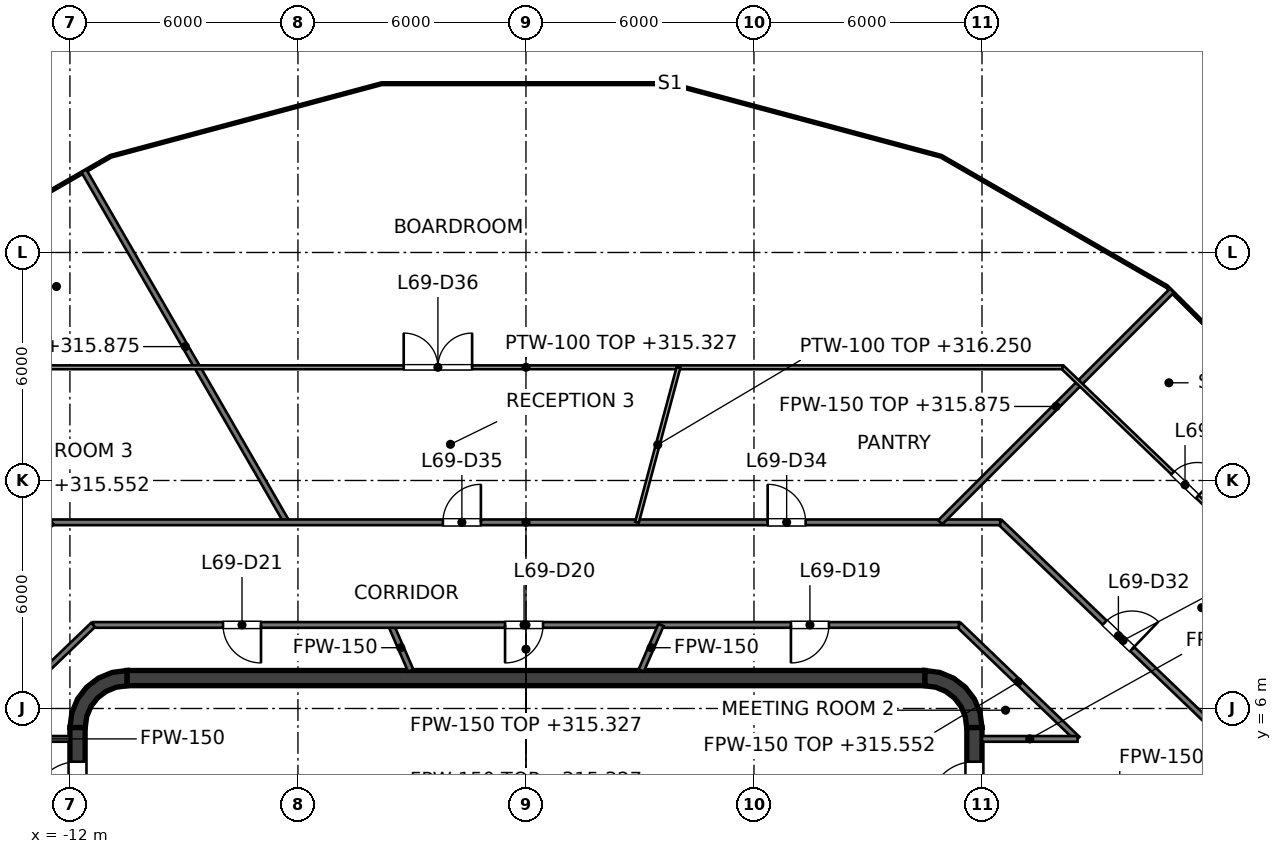
"""IFC4 building model, lengths in metres.
Left out: names, types, materials, properties, quantities, classifications, styles, units other than length and angle.
Written with IfcOpenShell. Run it as: python <this file> out.ifc"""

import sys

from ifc_helpers import new_model, si_unit, direction, frame, frame_2d, origin, place, context, subcontext, project, spatial, polyline, rectangle, outline, extrude, element, fill, save


model = new_model("IFC4")
c1 = context("Model", 3, precision=1e-05, world=origin(), true_north=direction((0.0, 1.0)))
c2 = subcontext(c1, "Body", "Model", "MODEL_VIEW")
j1 = project(units=[si_unit("LENGTHUNIT", "METRE"), si_unit("PLANEANGLEUNIT", "RADIAN")], contexts=[c1])
p1 = place(None, origin())
s1 = spatial("IfcSite", under=j1, at=p1, CompositionType="ELEMENT")
p2 = place(p1, origin())
s2 = spatial("IfcBuilding", under=s1, at=p2, CompositionType="ELEMENT")
p3 = place(p2, frame((0.0, 0.0, 312.4)))
s3 = spatial("IfcBuildingStorey", under=s2, at=p3, CompositionType="ELEMENT", Elevation=312.4)
p4 = place(p3, frame((-10.5, 6.8, 0.0), z_axis=(0.0, 0.0, 1.0), x_axis=(1.0, 0.0, 0.0)))
e1 = element("IfcWall", 1, at=p4, inside=s3, PredefinedType="SHEAR", context=c2, shape_type="SweptSolid", body=[
    extrude(rectangle(XDim=21.0, YDim=0.4, at=frame_2d((10.5, 0.0))), origin(), (0.0, 0.0, 1.0), 4.0),
])
p5 = place(p3, frame((11.8, -5.5, 0.0), z_axis=(0.0, 0.0, 1.0), x_axis=(0.0, 1.0, 0.0)))
e2 = element("IfcWall", 2, at=p5, inside=s3, PredefinedType="SHEAR", context=c2, shape_type="SweptSolid", body=[
    extrude(rectangle(XDim=11.0, YDim=0.4, at=frame_2d((5.5, 0.0))), origin(), (0.0, 0.0, 1.0), 4.0),
])
p6 = place(p5, frame((5.0, 0.0, 0.0)))
e3 = element("IfcOpeningElement", 3, at=p6, cuts=e2, PredefinedType="OPENING", context=c2, shape_type="SweptSolid", body=[
    extrude(rectangle(XDim=1.0, YDim=2.1, at=frame_2d((0.5, 1.05))), frame((0.0, 0.2, 0.0), z_axis=(0.0, -1.0, 0.0), x_axis=(1.0, 0.0, 0.0)), (0.0, 0.0, 1.0), 0.4),
])
p7 = place(p5, frame((0.9, 0.0, 0.0)))
e4 = element("IfcOpeningElement", 4, at=p7, cuts=e2, PredefinedType="OPENING", context=c2, shape_type="SweptSolid", body=[
    extrude(rectangle(XDim=1.2, YDim=2.1, at=frame_2d((0.6, 1.05))), frame((0.0, 0.2, 0.0), z_axis=(0.0, -1.0, 0.0), x_axis=(1.0, 0.0, 0.0)), (0.0, 0.0, 1.0), 0.4),
])
p8 = place(p5, frame((8.9, 0.0, 0.0)))
e5 = element("IfcOpeningElement", 5, at=p8, cuts=e2, PredefinedType="OPENING", context=c2, shape_type="SweptSolid", body=[
    extrude(rectangle(XDim=1.2, YDim=2.1, at=frame_2d((0.6, 1.05))), frame((0.0, 0.2, 0.0), z_axis=(0.0, -1.0, 0.0), x_axis=(1.0, 0.0, 0.0)), (0.0, 0.0, 1.0), 0.4),
])
p9 = place(p3, frame((-11.8, -5.5, 0.0), z_axis=(0.0, 0.0, 1.0), x_axis=(0.0, 1.0, 0.0)))
e6 = element("IfcWall", 6, at=p9, inside=s3, PredefinedType="SHEAR", context=c2, shape_type="SweptSolid", body=[
    extrude(rectangle(XDim=11.0, YDim=0.4, at=frame_2d((5.5, 0.0))), origin(), (0.0, 0.0, 1.0), 4.0),
])
p10 = place(p9, frame((5.0, 0.0, 0.0)))
e7 = element("IfcOpeningElement", 7, at=p10, cuts=e6, PredefinedType="OPENING", context=c2, shape_type="SweptSolid", body=[
    extrude(rectangle(XDim=1.0, YDim=2.1, at=frame_2d((0.5, 1.05))), frame((0.0, 0.2, 0.0), z_axis=(0.0, -1.0, 0.0), x_axis=(1.0, 0.0, 0.0)), (0.0, 0.0, 1.0), 0.4),
])
p11 = place(p9, frame((0.9, 0.0, 0.0)))
e8 = element("IfcOpeningElement", 8, at=p11, cuts=e6, PredefinedType="OPENING", context=c2, shape_type="SweptSolid", body=[
    extrude(rectangle(XDim=1.2, YDim=2.1, at=frame_2d((0.6, 1.05))), frame((0.0, 0.2, 0.0), z_axis=(0.0, -1.0, 0.0), x_axis=(1.0, 0.0, 0.0)), (0.0, 0.0, 1.0), 0.4),
])
p12 = place(p9, frame((8.9, 0.0, 0.0)))
e9 = element("IfcOpeningElement", 9, at=p12, cuts=e6, PredefinedType="OPENING", context=c2, shape_type="SweptSolid", body=[
    extrude(rectangle(XDim=1.2, YDim=2.1, at=frame_2d((0.6, 1.05))), frame((0.0, 0.2, 0.0), z_axis=(0.0, -1.0, 0.0), x_axis=(1.0, 0.0, 0.0)), (0.0, 0.0, 1.0), 0.4),
])
p13 = place(p3, origin())
e10 = element("IfcWall", 10, at=p13, inside=s3, PredefinedType="SHEAR", context=c2, shape_type="SweptSolid", body=[
    extrude(outline(polyline([(10.5, 7.0), (10.5, 6.596), (10.784, 6.559), (11.048, 6.45), (11.275, 6.275), (11.45, 6.048), (11.559, 5.784), (11.596, 5.5), (12.0, 5.5), (11.949, 5.888), (11.799, 6.25), (11.561, 6.561), (11.25, 6.799), (10.888, 6.949), (10.5, 7.0)])), origin(), (0.0, 0.0, 1.0), 4.0),
])
e11 = element("IfcWall", 11, at=p13, inside=s3, PredefinedType="SHEAR", context=c2, shape_type="SweptSolid", body=[
    extrude(outline(polyline([(-12.0, 5.5), (-11.596, 5.5), (-11.559, 5.784), (-11.45, 6.048), (-11.275, 6.275), (-11.048, 6.45), (-10.784, 6.559), (-10.5, 6.596), (-10.5, 7.0), (-10.888, 6.949), (-11.25, 6.799), (-11.561, 6.561), (-11.799, 6.25), (-11.949, 5.888), (-12.0, 5.5)])), origin(), (0.0, 0.0, 1.0), 4.0),
])
p14 = place(p3, frame((-9.0, 4.1, 0.0), z_axis=(0.0, 0.0, 1.0), x_axis=(0.0, 1.0, 0.0)))
e12 = element("IfcWall", 12, at=p14, inside=s3, PredefinedType="SOLIDWALL", context=c2, shape_type="SweptSolid", body=[
    extrude(rectangle(XDim=2.5, YDim=0.25, at=frame_2d((1.25, 0.0))), origin(), (0.0, 0.0, 1.0), 3.85),
])
p15 = place(p14, frame((0.65, 0.0, 0.0)))
e13 = element("IfcOpeningElement", 13, at=p15, cuts=e12, PredefinedType="OPENING", context=c2, shape_type="SweptSolid", body=[
    extrude(rectangle(XDim=1.2, YDim=2.1, at=frame_2d((0.6, 1.05))), frame((0.0, 0.125, 0.0), z_axis=(0.0, -1.0, 0.0), x_axis=(1.0, 0.0, 0.0)), (0.0, 0.0, 1.0), 0.25),
])
p16 = place(p3, frame((9.0, 4.1, 0.0), z_axis=(0.0, 0.0, 1.0), x_axis=(0.0, 1.0, 0.0)))
e14 = element("IfcWall", 14, at=p16, inside=s3, PredefinedType="SOLIDWALL", context=c2, shape_type="SweptSolid", body=[
    extrude(rectangle(XDim=2.5, YDim=0.25, at=frame_2d((1.25, 0.0))), origin(), (0.0, 0.0, 1.0), 3.85),
])
p17 = place(p16, frame((0.65, 0.0, 0.0)))
e15 = element("IfcOpeningElement", 15, at=p17, cuts=e14, PredefinedType="OPENING", context=c2, shape_type="SweptSolid", body=[
    extrude(rectangle(XDim=1.2, YDim=2.1, at=frame_2d((0.6, 1.05))), frame((0.0, 0.125, 0.0), z_axis=(0.0, -1.0, 0.0), x_axis=(1.0, 0.0, 0.0)), (0.0, 0.0, 1.0), 0.25),
])
for number, where, z_axis, x_axis in (
    (16, (-3.15, 4.1, 0.0), (0.0, 0.0, 1.0), (0.0, 1.0, 0.0)),
    (17, (3.15, 4.1, 0.0), (0.0, 0.0, 1.0), (0.0, 1.0, 0.0)),
):
    element("IfcWall", number, at=place(p3, frame(where, z_axis=z_axis, x_axis=x_axis)), inside=s3, PredefinedType="SOLIDWALL", context=c2, shape_type="SweptSolid", body=[
        extrude(rectangle(XDim=2.5, YDim=0.25, at=frame_2d((1.25, 0.0))), origin(), (0.0, 0.0, 1.0), 3.85),
    ])
p18 = place(p3, frame((-3.553, 8.199, 0.0), z_axis=(0.0, 0.0, 1.0), x_axis=(0.397906243356, -0.917426085033, 0.0)))
e18 = element("IfcWall", 18, at=p18, inside=s3, PredefinedType="PARTITIONING", context=c2, shape_type="SweptSolid", body=[
    extrude(rectangle(XDim=1.307, YDim=0.15, at=frame_2d((0.653, 0.0))), origin(), (0.0, 0.0, 1.0), 3.85),
])
p19 = place(p3, frame((-11.632, 20.147, 0.0), z_axis=(0.0, 0.0, 1.0), x_axis=(0.499965221797, -0.866045482058, 0.0)))
e19 = element("IfcWall", 19, at=p19, inside=s3, PredefinedType="PARTITIONING", context=c2, shape_type="SweptSolid", body=[
    extrude(rectangle(XDim=10.678, YDim=0.15, at=frame_2d((5.339, 0.0))), origin(), (0.0, 0.0, 1.0), 3.475),
])
p20 = place(p3, frame((11.391, 8.199, 0.0), z_axis=(0.0, 0.0, 1.0), x_axis=(0.721311820102, -0.69261046641, 0.0)))
e20 = element("IfcWall", 20, at=p20, inside=s3, PredefinedType="PARTITIONING", context=c2, shape_type="SweptSolid", body=[
    extrude(rectangle(XDim=4.33, YDim=0.15, at=frame_2d((2.165, 0.0))), origin(), (0.0, 0.0, 1.0), 3.152),
])
p21 = place(p3, frame((12.478, 10.899, 0.0), z_axis=(0.0, 0.0, 1.0), x_axis=(0.721299239471, -0.692623568137, 0.0)))
e21 = element("IfcWall", 21, at=p21, inside=s3, PredefinedType="PARTITIONING", context=c2, shape_type="SweptSolid", body=[
    extrude(rectangle(XDim=8.974, YDim=0.15, at=frame_2d((4.487, 0.0))), origin(), (0.0, 0.0, 1.0), 3.076),
])
p22 = place(p21, frame((3.813, 0.0, 0.0)))
e22 = element("IfcOpeningElement", 22, at=p22, cuts=e21, PredefinedType="OPENING", context=c2, shape_type="SweptSolid", body=[
    extrude(rectangle(XDim=1.0, YDim=2.1, at=frame_2d((0.5, 1.05))), frame((0.0, 0.075, 0.0), z_axis=(0.0, -1.0, 0.0), x_axis=(1.0, 0.0, 0.0)), (0.0, 0.0, 1.0), 0.15),
])
for number, where, z_axis, x_axis in (
    (23, (-14.514, 5.2, 0.0), (0.0, 0.0, 1.0), (1.0, 0.0, 0.0)),
    (24, (12.0, 5.2, 0.0), (0.0, 0.0, 1.0), (1.0, 0.0, 0.0)),
):
    element("IfcWall", number, at=place(p3, frame(where, z_axis=z_axis, x_axis=x_axis)), inside=s3, PredefinedType="PARTITIONING", context=c2, shape_type="SweptSolid", body=[
        extrude(rectangle(XDim=2.514, YDim=0.15, at=frame_2d((1.257, 0.0))), origin(), (0.0, 0.0, 1.0), 3.85),
    ])
p23 = place(p3, frame((-11.391, 8.199, 0.0), z_axis=(0.0, 0.0, 1.0), x_axis=(1.0, 0.0, 0.0)))
e25 = element("IfcWall", 25, at=p23, inside=s3, PredefinedType="PARTITIONING", context=c2, shape_type="SweptSolid", body=[
    extrude(rectangle(XDim=22.782, YDim=0.15, at=frame_2d((11.391, 0.0))), origin(), (0.0, 0.0, 1.0), 2.927),
])
p24 = place(p23, frame((18.363, 0.0, 0.0)))
e26 = element("IfcOpeningElement", 26, at=p24, cuts=e25, PredefinedType="OPENING", context=c2, shape_type="SweptSolid", body=[
    extrude(rectangle(XDim=1.0, YDim=2.1, at=frame_2d((0.5, 1.05))), frame((0.0, 0.075, 0.0), z_axis=(0.0, -1.0, 0.0), x_axis=(1.0, 0.0, 0.0)), (0.0, 0.0, 1.0), 0.15),
])
p25 = place(p23, frame((10.841, 0.0, 0.0)))
e27 = element("IfcOpeningElement", 27, at=p25, cuts=e25, PredefinedType="OPENING", context=c2, shape_type="SweptSolid", body=[
    extrude(rectangle(XDim=1.0, YDim=2.1, at=frame_2d((0.5, 1.05))), frame((0.0, 0.075, 0.0), z_axis=(0.0, -1.0, 0.0), x_axis=(1.0, 0.0, 0.0)), (0.0, 0.0, 1.0), 0.15),
])
p26 = place(p23, frame((3.419, 0.0, 0.0)))
e28 = element("IfcOpeningElement", 28, at=p26, cuts=e25, PredefinedType="OPENING", context=c2, shape_type="SweptSolid", body=[
    extrude(rectangle(XDim=1.0, YDim=2.1, at=frame_2d((0.5, 1.05))), frame((0.0, 0.075, 0.0), z_axis=(0.0, -1.0, 0.0), x_axis=(1.0, 0.0, 0.0)), (0.0, 0.0, 1.0), 0.15),
])
p27 = place(p3, frame((-12.478, 10.899, 0.0), z_axis=(0.0, 0.0, 1.0), x_axis=(1.0, 0.0, 0.0)))
e29 = element("IfcWall", 29, at=p27, inside=s3, PredefinedType="PARTITIONING", context=c2, shape_type="SweptSolid", body=[
    extrude(rectangle(XDim=24.956, YDim=0.15, at=frame_2d((12.478, 0.0))), origin(), (0.0, 0.0, 1.0), 2.927),
])
p28 = place(p27, frame((18.838, 0.0, 0.0)))
e30 = element("IfcOpeningElement", 30, at=p28, cuts=e29, PredefinedType="OPENING", context=c2, shape_type="SweptSolid", body=[
    extrude(rectangle(XDim=1.0, YDim=2.1, at=frame_2d((0.5, 1.05))), frame((0.0, 0.075, 0.0), z_axis=(0.0, -1.0, 0.0), x_axis=(1.0, 0.0, 0.0)), (0.0, 0.0, 1.0), 0.15),
])
p29 = place(p27, frame((10.292, 0.0, 0.0)))
e31 = element("IfcOpeningElement", 31, at=p29, cuts=e29, PredefinedType="OPENING", context=c2, shape_type="SweptSolid", body=[
    extrude(rectangle(XDim=1.0, YDim=2.1, at=frame_2d((0.5, 1.05))), frame((0.0, 0.075, 0.0), z_axis=(0.0, -1.0, 0.0), x_axis=(1.0, 0.0, 0.0)), (0.0, 0.0, 1.0), 0.15),
])
p30 = place(p3, frame((-14.514, 5.2, 0.0), z_axis=(0.0, 0.0, 1.0), x_axis=(0.721228427004, 0.692697304803, 0.0)))
e32 = element("IfcWall", 32, at=p30, inside=s3, PredefinedType="PARTITIONING", context=c2, shape_type="SweptSolid", body=[
    extrude(rectangle(XDim=4.33, YDim=0.15, at=frame_2d((2.165, 0.0))), origin(), (0.0, 0.0, 1.0), 3.152),
])
p31 = place(p3, frame((-18.95, 4.683, 0.0), z_axis=(0.0, 0.0, 1.0), x_axis=(0.721259541977, 0.692664906797, 0.0)))
e33 = element("IfcWall", 33, at=p31, inside=s3, PredefinedType="PARTITIONING", context=c2, shape_type="SweptSolid", body=[
    extrude(rectangle(XDim=8.973, YDim=0.15, at=frame_2d((4.487, 0.0))), origin(), (0.0, 0.0, 1.0), 3.076),
])
p32 = place(p3, frame((10.9, 10.899, 0.0), z_axis=(0.0, 0.0, 1.0), x_axis=(0.707106781187, 0.707106781187, 0.0)))
e34 = element("IfcWall", 34, at=p32, inside=s3, PredefinedType="PARTITIONING", context=c2, shape_type="SweptSolid", body=[
    extrude(rectangle(XDim=8.624, YDim=0.15, at=frame_2d((4.312, 0.0))), origin(), (0.0, 0.0, 1.0), 3.475),
])
p33 = place(p3, frame((3.033, 7.0, 0.0), z_axis=(0.0, 0.0, 1.0), x_axis=(0.397906243356, 0.917426085033, 0.0)))
e35 = element("IfcWall", 35, at=p33, inside=s3, PredefinedType="PARTITIONING", context=c2, shape_type="SweptSolid", body=[
    extrude(rectangle(XDim=1.307, YDim=0.15, at=frame_2d((0.653, 0.0))), origin(), (0.0, 0.0, 1.0), 3.85),
])
p34 = place(p3, frame((14.12, 14.979, 0.0), z_axis=(0.0, 0.0, 1.0), x_axis=(0.721327687229, -0.69259394138, 0.0)))
e36 = element("IfcWall", 36, at=p34, inside=s3, PredefinedType="PARTITIONING", context=c2, shape_type="SweptSolid", body=[
    extrude(rectangle(XDim=12.354, YDim=0.1, at=frame_2d((6.177, 0.0))), origin(), (0.0, 0.0, 1.0), 2.995),
])
p35 = place(p34, frame((4.017, 0.0, 0.0)))
e37 = element("IfcOpeningElement", 37, at=p35, cuts=e36, PredefinedType="OPENING", context=c2, shape_type="SweptSolid", body=[
    extrude(rectangle(XDim=0.9, YDim=2.1, at=frame_2d((0.45, 1.05))), frame((0.0, 0.05, 0.0), z_axis=(0.0, -1.0, 0.0), x_axis=(1.0, 0.0, 0.0)), (0.0, 0.0, 1.0), 0.1),
])
p36 = place(p3, frame((-14.12, 14.979, 0.0), z_axis=(0.0, 0.0, 1.0), x_axis=(1.0, 0.0, 0.0)))
e38 = element("IfcWall", 38, at=p36, inside=s3, PredefinedType="PARTITIONING", context=c2, shape_type="SweptSolid", body=[
    extrude(rectangle(XDim=28.24, YDim=0.1, at=frame_2d((14.12, 0.0))), origin(), (0.0, 0.0, 1.0), 2.927),
])
p37 = place(p36, frame((10.903, 0.0, 0.0)))
e39 = element("IfcOpeningElement", 39, at=p37, cuts=e38, PredefinedType="OPENING", context=c2, shape_type="SweptSolid", body=[
    extrude(rectangle(XDim=1.8, YDim=2.1, at=frame_2d((0.9, 1.05))), frame((0.0, 0.05, 0.0), z_axis=(0.0, -1.0, 0.0), x_axis=(1.0, 0.0, 0.0)), (0.0, 0.0, 1.0), 0.1),
])
p38 = place(p3, frame((2.921, 10.899, 0.0), z_axis=(0.0, 0.0, 1.0), x_axis=(0.258766902147, 0.965939796444, 0.0)))
e40 = element("IfcWall", 40, at=p38, inside=s3, PredefinedType="PARTITIONING", context=c2, shape_type="SweptSolid", body=[
    extrude(rectangle(XDim=4.224, YDim=0.1, at=frame_2d((2.112, 0.0))), origin(), (0.0, 0.0, 1.0), 3.85),
])
p39 = place(p15, origin())
e41 = element("IfcDoor", 41, at=p39, inside=s3, OperationType="SINGLE_SWING_RIGHT", PredefinedType="DOOR", context=c2, shape_type="SweptSolid", body=[
    extrude(rectangle(XDim=1.2, YDim=2.1, at=frame_2d((0.6, 1.05))), frame((0.0, 0.025, 0.0), z_axis=(0.0, -1.0, 0.0), x_axis=(1.0, 0.0, 0.0)), (0.0, 0.0, 1.0), 0.05),
])
fill(e13, e41)
p40 = place(p17, origin())
e42 = element("IfcDoor", 42, at=p40, inside=s3, OperationType="SINGLE_SWING_LEFT", PredefinedType="DOOR", context=c2, shape_type="SweptSolid", body=[
    extrude(rectangle(XDim=1.2, YDim=2.1, at=frame_2d((0.6, 1.05))), frame((0.0, 0.025, 0.0), z_axis=(0.0, -1.0, 0.0), x_axis=(1.0, 0.0, 0.0)), (0.0, 0.0, 1.0), 0.05),
])
fill(e15, e42)
p41 = place(p12, origin())
e43 = element("IfcDoor", 43, at=p41, inside=s3, OperationType="SINGLE_SWING_LEFT", PredefinedType="DOOR", context=c2, shape_type="SweptSolid", body=[
    extrude(rectangle(XDim=1.2, YDim=2.1, at=frame_2d((0.6, 1.05))), frame((0.0, 0.025, 0.0), z_axis=(0.0, -1.0, 0.0), x_axis=(1.0, 0.0, 0.0)), (0.0, 0.0, 1.0), 0.05),
])
fill(e9, e43)
p42 = place(p8, origin())
e44 = element("IfcDoor", 44, at=p42, inside=s3, OperationType="SINGLE_SWING_LEFT", PredefinedType="DOOR", context=c2, shape_type="SweptSolid", body=[
    extrude(rectangle(XDim=1.2, YDim=2.1, at=frame_2d((0.6, 1.05))), frame((0.0, 0.025, 0.0), z_axis=(0.0, -1.0, 0.0), x_axis=(1.0, 0.0, 0.0)), (0.0, 0.0, 1.0), 0.05),
])
fill(e5, e44)
p43 = place(p24, origin())
e45 = element("IfcDoor", 45, at=p43, inside=s3, OperationType="SINGLE_SWING_LEFT", PredefinedType="DOOR", context=c2, shape_type="SweptSolid", body=[
    extrude(rectangle(XDim=1.0, YDim=2.1, at=frame_2d((0.5, 1.05))), frame((0.0, 0.025, 0.0), z_axis=(0.0, -1.0, 0.0), x_axis=(1.0, 0.0, 0.0)), (0.0, 0.0, 1.0), 0.05),
])
fill(e26, e45)
p44 = place(p25, origin())
e46 = element("IfcDoor", 46, at=p44, inside=s3, OperationType="SINGLE_SWING_LEFT", PredefinedType="DOOR", context=c2, shape_type="SweptSolid", body=[
    extrude(rectangle(XDim=1.0, YDim=2.1, at=frame_2d((0.5, 1.05))), frame((0.0, 0.025, 0.0), z_axis=(0.0, -1.0, 0.0), x_axis=(1.0, 0.0, 0.0)), (0.0, 0.0, 1.0), 0.05),
])
fill(e27, e46)
p45 = place(p26, origin())
e47 = element("IfcDoor", 47, at=p45, inside=s3, OperationType="SINGLE_SWING_RIGHT", PredefinedType="DOOR", context=c2, shape_type="SweptSolid", body=[
    extrude(rectangle(XDim=1.0, YDim=2.1, at=frame_2d((0.5, 1.05))), frame((0.0, 0.025, 0.0), z_axis=(0.0, -1.0, 0.0), x_axis=(1.0, 0.0, 0.0)), (0.0, 0.0, 1.0), 0.05),
])
fill(e28, e47)
p46 = place(p22, origin())
e48 = element("IfcDoor", 48, at=p46, inside=s3, OperationType="SINGLE_SWING_RIGHT", PredefinedType="DOOR", context=c2, shape_type="SweptSolid", body=[
    extrude(rectangle(XDim=1.0, YDim=2.1, at=frame_2d((0.5, 1.05))), frame((0.0, 0.025, 0.0), z_axis=(0.0, -1.0, 0.0), x_axis=(1.0, 0.0, 0.0)), (0.0, 0.0, 1.0), 0.05),
])
fill(e22, e48)
p47 = place(p35, origin())
e49 = element("IfcDoor", 49, at=p47, inside=s3, OperationType="SINGLE_SWING_RIGHT", PredefinedType="DOOR", context=c2, shape_type="SweptSolid", body=[
    extrude(rectangle(XDim=0.9, YDim=2.1, at=frame_2d((0.45, 1.05))), frame((0.0, 0.025, 0.0), z_axis=(0.0, -1.0, 0.0), x_axis=(1.0, 0.0, 0.0)), (0.0, 0.0, 1.0), 0.05),
])
fill(e37, e49)
p48 = place(p28, origin())
e50 = element("IfcDoor", 50, at=p48, inside=s3, OperationType="SINGLE_SWING_LEFT", PredefinedType="DOOR", context=c2, shape_type="SweptSolid", body=[
    extrude(rectangle(XDim=1.0, YDim=2.1, at=frame_2d((0.5, 1.05))), frame((0.0, 0.025, 0.0), z_axis=(0.0, -1.0, 0.0), x_axis=(1.0, 0.0, 0.0)), (0.0, 0.0, 1.0), 0.05),
])
fill(e30, e50)
p49 = place(p29, origin())
e51 = element("IfcDoor", 51, at=p49, inside=s3, OperationType="SINGLE_SWING_RIGHT", PredefinedType="DOOR", context=c2, shape_type="SweptSolid", body=[
    extrude(rectangle(XDim=1.0, YDim=2.1, at=frame_2d((0.5, 1.05))), frame((0.0, 0.025, 0.0), z_axis=(0.0, -1.0, 0.0), x_axis=(1.0, 0.0, 0.0)), (0.0, 0.0, 1.0), 0.05),
])
fill(e31, e51)
p50 = place(p37, origin())
e52 = element("IfcDoor", 52, at=p50, inside=s3, OperationType="DOUBLE_DOOR_SINGLE_SWING", PredefinedType="DOOR", context=c2, shape_type="SweptSolid", body=[
    extrude(rectangle(XDim=1.8, YDim=2.1, at=frame_2d((0.9, 1.05))), frame((0.0, 0.025, 0.0), z_axis=(0.0, -1.0, 0.0), x_axis=(1.0, 0.0, 0.0)), (0.0, 0.0, 1.0), 0.05),
])
fill(e39, e52)
save(model, sys.argv[1])
